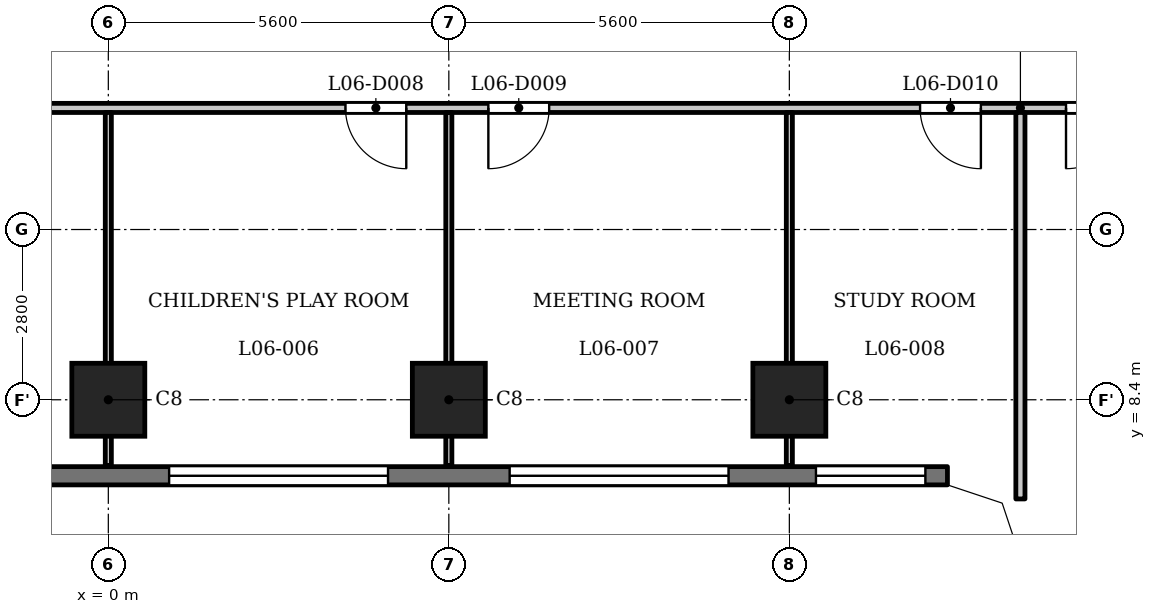
"""IFC4 building model, lengths in metres.
Left out: names, types, materials, properties, quantities, classifications, styles, units other than length and angle.
Written with IfcOpenShell. Run it as: python <this file> out.ifc"""

import sys

from ifc_helpers import new_model, si_unit, direction, frame, frame_2d, origin, origin_2d, place, context, subcontext, project, spatial, polyline, rectangle, outline, extrude, element, fill, save


model = new_model("IFC4")
c1 = context("Model", 3, precision=1e-05, world=origin(), true_north=direction((0.0, 1.0)))
c2 = subcontext(c1, "Body", "Model", "MODEL_VIEW")
j1 = project(units=[si_unit("LENGTHUNIT", "METRE"), si_unit("PLANEANGLEUNIT", "RADIAN")], contexts=[c1])
p1 = place(None, origin())
s1 = spatial("IfcSite", under=j1, at=p1, CompositionType="ELEMENT")
p2 = place(p1, origin())
s2 = spatial("IfcBuilding", under=s1, at=p2, CompositionType="ELEMENT")
p3 = place(p2, frame((0.0, 0.0, 30.5)))
s3 = spatial("IfcBuildingStorey", under=s2, at=p3, CompositionType="ELEMENT", Elevation=30.5)
for number, where, z_axis, x_axis in (
    (1, (0.0, 8.4, 0.0), (0.0, 0.0, 1.0), (1.0, 0.0, 0.0)),
    (2, (5.6, 8.4, 0.0), (0.0, 0.0, 1.0), (1.0, 0.0, 0.0)),
    (3, (11.2, 8.4, 0.0), (0.0, 0.0, 1.0), (1.0, 0.0, 0.0)),
):
    element("IfcColumn", number, at=place(p3, frame(where, z_axis=z_axis, x_axis=x_axis)), inside=s3, PredefinedType="COLUMN", context=c2, shape_type="SweptSolid", body=[
        extrude(rectangle(XDim=1.2, YDim=1.2, at=origin_2d()), origin(), (0.0, 0.0, 1.0), 3.5),
    ])
p4 = place(p3, frame((-13.8, 7.15, 0.0), z_axis=(0.0, 0.0, 1.0), x_axis=(1.0, 0.0, 0.0)))
e4 = element("IfcWall", 4, at=p4, inside=s3, PredefinedType="SOLIDWALL", context=c2, shape_type="SweptSolid", body=[
    extrude(rectangle(XDim=27.6, YDim=0.3, at=frame_2d((13.8, 0.0))), origin(), (0.0, 0.0, 1.0), 3.2),
])
p5 = place(p4, frame((0.363, 0.0, 0.9)))
e5 = element("IfcOpeningElement", 5, at=p5, cuts=e4, PredefinedType="OPENING", context=c2, shape_type="SweptSolid", body=[
    extrude(rectangle(XDim=1.8, YDim=1.25, at=frame_2d((0.9, 0.625))), frame((0.0, 0.16, 0.0), z_axis=(0.0, -1.0, 0.0), x_axis=(1.0, 0.0, 0.0)), (0.0, 0.0, 1.0), 0.32),
])
p6 = place(p4, frame((3.6, 0.0, 1.2)))
e6 = element("IfcOpeningElement", 6, at=p6, cuts=e4, PredefinedType="OPENING", context=c2, shape_type="SweptSolid", body=[
    extrude(rectangle(XDim=3.6, YDim=0.95, at=frame_2d((1.8, 0.475))), frame((0.0, 0.16, 0.0), z_axis=(0.0, -1.0, 0.0), x_axis=(1.0, 0.0, 0.0)), (0.0, 0.0, 1.0), 0.32),
])
p7 = place(p4, frame((9.2, 0.0, 1.2)))
e7 = element("IfcOpeningElement", 7, at=p7, cuts=e4, PredefinedType="OPENING", context=c2, shape_type="SweptSolid", body=[
    extrude(rectangle(XDim=3.6, YDim=0.95, at=frame_2d((1.8, 0.475))), frame((0.0, 0.16, 0.0), z_axis=(0.0, -1.0, 0.0), x_axis=(1.0, 0.0, 0.0)), (0.0, 0.0, 1.0), 0.32),
])
p8 = place(p4, frame((14.8, 0.0, 1.2)))
e8 = element("IfcOpeningElement", 8, at=p8, cuts=e4, PredefinedType="OPENING", context=c2, shape_type="SweptSolid", body=[
    extrude(rectangle(XDim=3.6, YDim=0.95, at=frame_2d((1.8, 0.475))), frame((0.0, 0.16, 0.0), z_axis=(0.0, -1.0, 0.0), x_axis=(1.0, 0.0, 0.0)), (0.0, 0.0, 1.0), 0.32),
])
p9 = place(p4, frame((20.4, 0.0, 1.2)))
e9 = element("IfcOpeningElement", 9, at=p9, cuts=e4, PredefinedType="OPENING", context=c2, shape_type="SweptSolid", body=[
    extrude(rectangle(XDim=3.6, YDim=0.95, at=frame_2d((1.8, 0.475))), frame((0.0, 0.16, 0.0), z_axis=(0.0, -1.0, 0.0), x_axis=(1.0, 0.0, 0.0)), (0.0, 0.0, 1.0), 0.32),
])
p10 = place(p4, frame((25.438, 0.0, 0.9)))
e10 = element("IfcOpeningElement", 10, at=p10, cuts=e4, PredefinedType="OPENING", context=c2, shape_type="SweptSolid", body=[
    extrude(rectangle(XDim=1.8, YDim=1.25, at=frame_2d((0.9, 0.625))), frame((0.0, 0.16, 0.0), z_axis=(0.0, -1.0, 0.0), x_axis=(1.0, 0.0, 0.0)), (0.0, 0.0, 1.0), 0.32),
])
p11 = place(p3, frame((-17.4, 13.2, 0.0), z_axis=(0.0, 0.0, 1.0), x_axis=(1.0, 0.0, 0.0)))
e11 = element("IfcWall", 11, at=p11, inside=s3, PredefinedType="PARTITIONING", context=c2, shape_type="SweptSolid", body=[
    extrude(rectangle(XDim=34.8, YDim=0.15, at=frame_2d((17.4, 0.0))), origin(), (0.0, 0.0, 1.0), 3.2),
])
p12 = place(p11, frame((0.75, 0.0, 0.0)))
e12 = element("IfcOpeningElement", 12, at=p12, cuts=e11, PredefinedType="OPENING", context=c2, shape_type="SweptSolid", body=[
    extrude(rectangle(XDim=1.0, YDim=2.1, at=frame_2d((0.5, 1.05))), frame((0.0, 0.085, 0.0), z_axis=(0.0, -1.0, 0.0), x_axis=(1.0, 0.0, 0.0)), (0.0, 0.0, 1.0), 0.17),
])
p13 = place(p11, frame((33.15, 0.0, 0.0)))
e13 = element("IfcOpeningElement", 13, at=p13, cuts=e11, PredefinedType="OPENING", context=c2, shape_type="SweptSolid", body=[
    extrude(rectangle(XDim=1.0, YDim=2.1, at=frame_2d((0.5, 1.05))), frame((0.0, 0.085, 0.0), z_axis=(0.0, -1.0, 0.0), x_axis=(1.0, 0.0, 0.0)), (0.0, 0.0, 1.0), 0.17),
])
p14 = place(p11, frame((3.05, 0.0, 0.0)))
e14 = element("IfcOpeningElement", 14, at=p14, cuts=e11, PredefinedType="OPENING", context=c2, shape_type="SweptSolid", body=[
    extrude(rectangle(XDim=1.0, YDim=2.1, at=frame_2d((0.5, 1.05))), frame((0.0, 0.085, 0.0), z_axis=(0.0, -1.0, 0.0), x_axis=(1.0, 0.0, 0.0)), (0.0, 0.0, 1.0), 0.17),
])
p15 = place(p11, frame((10.1, 0.0, 0.0)))
e15 = element("IfcOpeningElement", 15, at=p15, cuts=e11, PredefinedType="OPENING", context=c2, shape_type="SweptSolid", body=[
    extrude(rectangle(XDim=1.0, YDim=2.1, at=frame_2d((0.5, 1.05))), frame((0.0, 0.085, 0.0), z_axis=(0.0, -1.0, 0.0), x_axis=(1.0, 0.0, 0.0)), (0.0, 0.0, 1.0), 0.17),
])
p16 = place(p11, frame((12.45, 0.0, 0.0)))
e16 = element("IfcOpeningElement", 16, at=p16, cuts=e11, PredefinedType="OPENING", context=c2, shape_type="SweptSolid", body=[
    extrude(rectangle(XDim=1.0, YDim=2.1, at=frame_2d((0.5, 1.05))), frame((0.0, 0.085, 0.0), z_axis=(0.0, -1.0, 0.0), x_axis=(1.0, 0.0, 0.0)), (0.0, 0.0, 1.0), 0.17),
])
p17 = place(p11, frame((21.3, 0.0, 0.0)))
e17 = element("IfcOpeningElement", 17, at=p17, cuts=e11, PredefinedType="OPENING", context=c2, shape_type="SweptSolid", body=[
    extrude(rectangle(XDim=1.0, YDim=2.1, at=frame_2d((0.5, 1.05))), frame((0.0, 0.085, 0.0), z_axis=(0.0, -1.0, 0.0), x_axis=(1.0, 0.0, 0.0)), (0.0, 0.0, 1.0), 0.17),
])
p18 = place(p11, frame((23.65, 0.0, 0.0)))
e18 = element("IfcOpeningElement", 18, at=p18, cuts=e11, PredefinedType="OPENING", context=c2, shape_type="SweptSolid", body=[
    extrude(rectangle(XDim=1.0, YDim=2.1, at=frame_2d((0.5, 1.05))), frame((0.0, 0.085, 0.0), z_axis=(0.0, -1.0, 0.0), x_axis=(1.0, 0.0, 0.0)), (0.0, 0.0, 1.0), 0.17),
])
p19 = place(p11, frame((30.75, 0.0, 0.0)))
e19 = element("IfcOpeningElement", 19, at=p19, cuts=e11, PredefinedType="OPENING", context=c2, shape_type="SweptSolid", body=[
    extrude(rectangle(XDim=1.0, YDim=2.1, at=frame_2d((0.5, 1.05))), frame((0.0, 0.085, 0.0), z_axis=(0.0, -1.0, 0.0), x_axis=(1.0, 0.0, 0.0)), (0.0, 0.0, 1.0), 0.17),
])
for number, where, z_axis, x_axis in (
    (20, (0.0, 7.32, 0.0), (0.0, 0.0, 1.0), (0.0, 1.0, 0.0)),
    (21, (5.6, 7.32, 0.0), (0.0, 0.0, 1.0), (0.0, 1.0, 0.0)),
    (22, (11.2, 7.32, 0.0), (0.0, 0.0, 1.0), (0.0, 1.0, 0.0)),
):
    element("IfcWall", number, at=place(p3, frame(where, z_axis=z_axis, x_axis=x_axis)), inside=s3, PredefinedType="PARTITIONING", context=c2, shape_type="SweptSolid", body=[
        extrude(rectangle(XDim=5.805, YDim=0.1, at=frame_2d((2.902, 0.0))), origin(), (0.0, 0.0, 1.0), 3.2),
    ])
p20 = place(p3, frame((15.0, 6.769, 0.0), z_axis=(0.0, 0.0, 1.0), x_axis=(0.0, 1.0, 0.0)))
e23 = element("IfcWall", 23, at=p20, inside=s3, PredefinedType="PARTITIONING", context=c2, shape_type="SweptSolid", body=[
    extrude(rectangle(XDim=6.356, YDim=0.15, at=frame_2d((3.178, 0.0))), origin(), (0.0, 0.0, 1.0), 3.2),
])
p21 = place(p3, origin())
e24 = element("IfcWall", 24, at=p21, inside=s3, PredefinedType="SOLIDWALL", context=c2, shape_type="SweptSolid", body=[
    extrude(outline(polyline([(14.937, 6.937), (13.849, 7.3), (13.8, 7.3), (13.8, 7.0), (14.7, 6.7), (15.0, 5.8), (15.3, 5.8), (15.3, 5.849), (14.937, 6.937)])), origin(), (0.0, 0.0, 1.0), 3.2),
])
p22 = place(p13, origin())
e25 = element("IfcDoor", 25, at=p22, inside=s3, OperationType="SINGLE_SWING_LEFT", PredefinedType="DOOR", context=c2, shape_type="SweptSolid", body=[
    extrude(rectangle(XDim=1.0, YDim=2.1, at=frame_2d((0.5, 1.05))), frame((0.0, 0.025, 0.0), z_axis=(0.0, -1.0, 0.0), x_axis=(1.0, 0.0, 0.0)), (0.0, 0.0, 1.0), 0.05),
])
fill(e13, e25)
p23 = place(p17, origin())
e26 = element("IfcDoor", 26, at=p23, inside=s3, OperationType="SINGLE_SWING_RIGHT", PredefinedType="DOOR", context=c2, shape_type="SweptSolid", body=[
    extrude(rectangle(XDim=1.0, YDim=2.1, at=frame_2d((0.5, 1.05))), frame((0.0, 0.025, 0.0), z_axis=(0.0, -1.0, 0.0), x_axis=(1.0, 0.0, 0.0)), (0.0, 0.0, 1.0), 0.05),
])
fill(e17, e26)
p24 = place(p18, origin())
e27 = element("IfcDoor", 27, at=p24, inside=s3, OperationType="SINGLE_SWING_LEFT", PredefinedType="DOOR", context=c2, shape_type="SweptSolid", body=[
    extrude(rectangle(XDim=1.0, YDim=2.1, at=frame_2d((0.5, 1.05))), frame((0.0, 0.025, 0.0), z_axis=(0.0, -1.0, 0.0), x_axis=(1.0, 0.0, 0.0)), (0.0, 0.0, 1.0), 0.05),
])
fill(e18, e27)
p25 = place(p19, origin())
e28 = element("IfcDoor", 28, at=p25, inside=s3, OperationType="SINGLE_SWING_RIGHT", PredefinedType="DOOR", context=c2, shape_type="SweptSolid", body=[
    extrude(rectangle(XDim=1.0, YDim=2.1, at=frame_2d((0.5, 1.05))), frame((0.0, 0.025, 0.0), z_axis=(0.0, -1.0, 0.0), x_axis=(1.0, 0.0, 0.0)), (0.0, 0.0, 1.0), 0.05),
])
fill(e19, e28)
p26 = place(p8, origin())
e29 = element("IfcWindow", 29, at=p26, inside=s3, PartitioningType="SINGLE_PANEL", PredefinedType="WINDOW", context=c2, shape_type="SweptSolid", body=[
    extrude(rectangle(XDim=3.6, YDim=0.95, at=frame_2d((1.8, 0.475))), frame((0.0, 0.03, 0.0), z_axis=(0.0, -1.0, 0.0), x_axis=(1.0, 0.0, 0.0)), (0.0, 0.0, 1.0), 0.06),
])
fill(e8, e29)
p27 = place(p9, origin())
e30 = element("IfcWindow", 30, at=p27, inside=s3, PartitioningType="SINGLE_PANEL", PredefinedType="WINDOW", context=c2, shape_type="SweptSolid", body=[
    extrude(rectangle(XDim=3.6, YDim=0.95, at=frame_2d((1.8, 0.475))), frame((0.0, 0.03, 0.0), z_axis=(0.0, -1.0, 0.0), x_axis=(1.0, 0.0, 0.0)), (0.0, 0.0, 1.0), 0.06),
])
fill(e9, e30)
p28 = place(p10, origin())
e31 = element("IfcWindow", 31, at=p28, inside=s3, PartitioningType="SINGLE_PANEL", PredefinedType="WINDOW", context=c2, shape_type="SweptSolid", body=[
    extrude(rectangle(XDim=1.8, YDim=1.25, at=frame_2d((0.9, 0.625))), frame((0.0, 0.03, 0.0), z_axis=(0.0, -1.0, 0.0), x_axis=(1.0, 0.0, 0.0)), (0.0, 0.0, 1.0), 0.06),
])
fill(e10, e31)
save(model, sys.argv[1])
